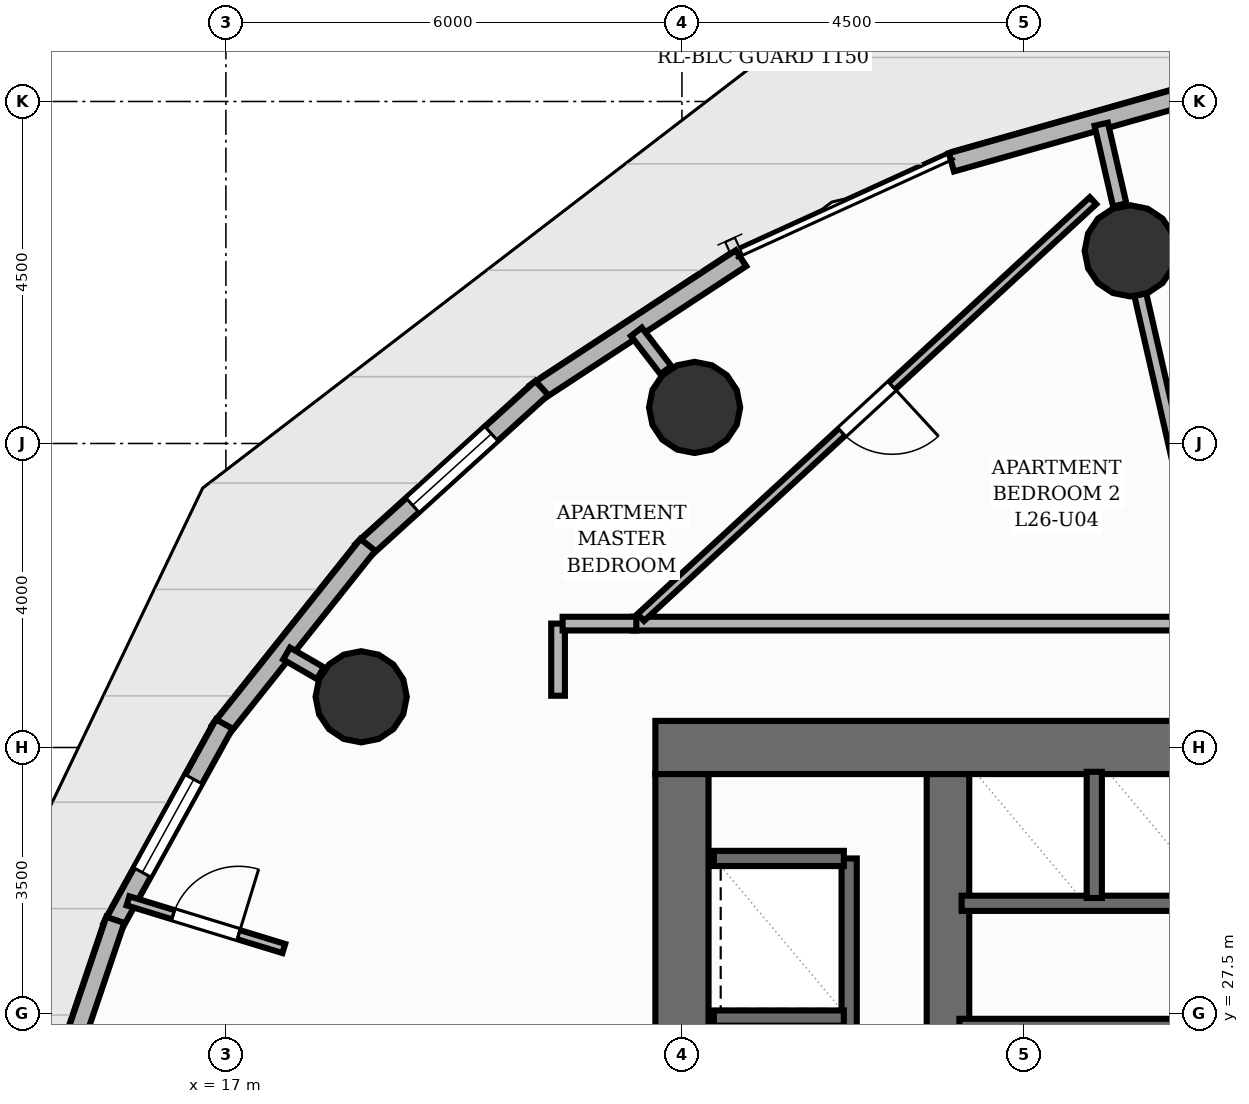
"""IFC4 building model, lengths in metres.
Left out: names, types, materials, properties, quantities, classifications, styles, units other than length and angle.
Written with IfcOpenShell. Run it as: python <this file> out.ifc"""

import sys

from ifc_helpers import new_model, si_unit, direction, frame, frame_2d, origin, origin_2d, place, context, subcontext, project, spatial, rectangle, circle, extrude, element, fill, save


model = new_model("IFC4")
c1 = context("Model", 3, precision=1e-05, world=origin(), true_north=direction((0.0, 1.0)))
c2 = subcontext(c1, "Body", "Model", "MODEL_VIEW")
j1 = project(units=[si_unit("LENGTHUNIT", "METRE"), si_unit("PLANEANGLEUNIT", "RADIAN")], contexts=[c1])
p1 = place(None, origin())
s1 = spatial("IfcSite", under=j1, at=p1, CompositionType="ELEMENT")
p2 = place(p1, origin())
s2 = spatial("IfcBuilding", under=s1, at=p2, CompositionType="ELEMENT")
p3 = place(p2, frame((0.0, 0.0, 90.08)))
s3 = spatial("IfcBuildingStorey", under=s2, at=p3, CompositionType="ELEMENT", Elevation=90.08)
p4 = place(p3, frame((22.65, 31.0, 0.0), z_axis=(0.0, 0.0, 1.0), x_axis=(1.0, 0.0, 0.0)))
e1 = element("IfcWall", 1, at=p4, inside=s3, PredefinedType="SHEAR", context=c2, shape_type="SweptSolid", body=[
    extrude(rectangle(XDim=18.7, YDim=0.7, at=frame_2d((9.35, 0.0))), origin(), (0.0, 0.0, 1.0), 3.2),
])
p5 = place(p4, frame((11.75, 0.0, 0.0)))
e2 = element("IfcOpeningElement", 2, at=p5, cuts=e1, PredefinedType="OPENING", context=c2, shape_type="SweptSolid", body=[
    extrude(rectangle(XDim=1.1, YDim=2.15, at=frame_2d((0.55, 1.075))), frame((0.0, 0.36, 0.0), z_axis=(0.0, -1.0, 0.0), x_axis=(1.0, 0.0, 0.0)), (0.0, 0.0, 1.0), 0.72),
])
p6 = place(p3, frame((23.0, 17.35, 0.0), z_axis=(0.0, 0.0, 1.0), x_axis=(0.0, 1.0, 0.0)))
e3 = element("IfcWall", 3, at=p6, inside=s3, PredefinedType="SHEAR", context=c2, shape_type="SweptSolid", body=[
    extrude(rectangle(XDim=13.3, YDim=0.7, at=frame_2d((6.65, 0.0))), origin(), (0.0, 0.0, 1.0), 3.2),
])
p7 = place(p3, frame((26.5, 17.35, 0.0), z_axis=(0.0, 0.0, 1.0), x_axis=(0.0, 1.0, 0.0)))
e4 = element("IfcWall", 4, at=p7, inside=s3, PredefinedType="SHEAR", context=c2, shape_type="SweptSolid", body=[
    extrude(rectangle(XDim=13.3, YDim=0.56, at=frame_2d((6.65, 0.0))), origin(), (0.0, 0.0, 1.0), 3.2),
])
for number, where, z_axis, x_axis in (
    (5, (28.898, 37.535, 0.0), (0.0, 0.0, 1.0), (1.0, 0.0, 0.0)),
    (6, (23.167, 35.474, 0.0), (0.0, 0.0, 1.0), (1.0, 0.0, 0.0)),
    (7, (18.78, 31.667, 0.0), (0.0, 0.0, 1.0), (1.0, 0.0, 0.0)),
):
    element("IfcColumn", number, at=place(p3, frame(where, z_axis=z_axis, x_axis=x_axis)), inside=s3, PredefinedType="COLUMN", context=c2, shape_type="SweptSolid", body=[
        extrude(circle(Radius=0.6, at=origin_2d()), origin(), (0.0, 0.0, 1.0), 3.2),
    ])
p8 = place(p3, frame((26.545, 38.699, 0.0), z_axis=(0.0, 0.0, 1.0), x_axis=(0.962134911526, 0.272573681825, 0.0)))
e8 = element("IfcWall", 8, at=p8, inside=s3, PredefinedType="SOLIDWALL", context=c2, shape_type="SweptSolid", body=[
    extrude(rectangle(XDim=3.26, YDim=0.25, at=frame_2d((1.63, 0.0))), origin(), (0.0, 0.0, 1.0), 2.96),
])
p9 = place(p3, frame((21.071, 35.663, 0.0), z_axis=(0.0, 0.0, 1.0), x_axis=(0.836273856728, 0.548311988336, 0.0)))
e9 = element("IfcWall", 9, at=p9, inside=s3, PredefinedType="SOLIDWALL", context=c2, shape_type="SweptSolid", body=[
    extrude(rectangle(XDim=3.236, YDim=0.25, at=frame_2d((1.618, 0.0))), origin(), (0.0, 0.0, 1.0), 2.96),
])
p10 = place(p3, frame((18.792, 33.586, 0.0), z_axis=(0.0, 0.0, 1.0), x_axis=(0.740832321657, 0.671690011232, 0.0)))
e10 = element("IfcWall", 10, at=p10, inside=s3, PredefinedType="SOLIDWALL", context=c2, shape_type="SweptSolid", body=[
    extrude(rectangle(XDim=3.192, YDim=0.25, at=frame_2d((1.596, 0.0))), origin(), (0.0, 0.0, 1.0), 2.96),
])
p11 = place(p10, frame((0.896, 0.0, 0.85)))
e11 = element("IfcOpeningElement", 11, at=p11, cuts=e10, PredefinedType="OPENING", context=c2, shape_type="SweptSolid", body=[
    extrude(rectangle(XDim=1.4, YDim=1.55, at=frame_2d((0.7, 0.775))), frame((0.0, 0.135, 0.0), z_axis=(0.0, -1.0, 0.0), x_axis=(1.0, 0.0, 0.0)), (0.0, 0.0, 1.0), 0.27),
])
p12 = place(p3, frame((16.916, 31.217, 0.0), z_axis=(0.0, 0.0, 1.0), x_axis=(0.623134406496, 0.782114768714, 0.0)))
e12 = element("IfcWall", 12, at=p12, inside=s3, PredefinedType="SOLIDWALL", context=c2, shape_type="SweptSolid", body=[
    extrude(rectangle(XDim=3.131, YDim=0.25, at=frame_2d((1.565, 0.0))), origin(), (0.0, 0.0, 1.0), 2.96),
])
p13 = place(p3, frame((15.5, 28.629, 0.0), z_axis=(0.0, 0.0, 1.0), x_axis=(0.482904421948, 0.875673066426, 0.0)))
e13 = element("IfcWall", 13, at=p13, inside=s3, PredefinedType="SOLIDWALL", context=c2, shape_type="SweptSolid", body=[
    extrude(rectangle(XDim=3.061, YDim=0.25, at=frame_2d((1.53, 0.0))), origin(), (0.0, 0.0, 1.0), 2.96),
])
p14 = place(p13, frame((0.83, 0.0, 0.85)))
e14 = element("IfcOpeningElement", 14, at=p14, cuts=e13, PredefinedType="OPENING", context=c2, shape_type="SweptSolid", body=[
    extrude(rectangle(XDim=1.4, YDim=1.55, at=frame_2d((0.7, 0.775))), frame((0.0, 0.135, 0.0), z_axis=(0.0, -1.0, 0.0), x_axis=(1.0, 0.0, 0.0)), (0.0, 0.0, 1.0), 0.27),
])
p15 = place(p3, frame((14.585, 25.901, 0.0), z_axis=(0.0, 0.0, 1.0), x_axis=(0.321149814784, 0.947028403198, 0.0)))
e15 = element("IfcWall", 15, at=p15, inside=s3, PredefinedType="SOLIDWALL", context=c2, shape_type="SweptSolid", body=[
    extrude(rectangle(XDim=2.988, YDim=0.25, at=frame_2d((1.494, 0.0))), origin(), (0.0, 0.0, 1.0), 2.96),
])
p16 = place(p3, frame((26.65, 27.33, 0.0), z_axis=(0.0, 0.0, 1.0), x_axis=(1.0, 0.0, 0.0)))
e16 = element("IfcWall", 16, at=p16, inside=s3, PredefinedType="SHEAR", context=c2, shape_type="SweptSolid", body=[
    extrude(rectangle(XDim=3.24, YDim=0.2, at=frame_2d((1.62, 0.0))), origin(), (0.0, 0.0, 1.0), 3.2),
])
p17 = place(p3, frame((25.2, 18.46, 0.0), z_axis=(0.0, 0.0, 1.0), x_axis=(0.0, 1.0, 0.0)))
e17 = element("IfcWall", 17, at=p17, inside=s3, PredefinedType="SHEAR", context=c2, shape_type="SweptSolid", body=[
    extrude(rectangle(XDim=11.08, YDim=0.2, at=frame_2d((5.54, 0.0))), origin(), (0.0, 0.0, 1.0), 3.2),
])
for number, where, z_axis, x_axis in (
    (18, (23.42, 29.54, 0.0), (0.0, 0.0, 1.0), (1.0, 0.0, 0.0)),
    (19, (23.42, 27.44, 0.0), (0.0, 0.0, 1.0), (1.0, 0.0, 0.0)),
):
    element("IfcWall", number, at=place(p3, frame(where, z_axis=z_axis, x_axis=x_axis)), inside=s3, PredefinedType="SHEAR", context=c2, shape_type="SweptSolid", body=[
        extrude(rectangle(XDim=1.71, YDim=0.2, at=frame_2d((0.855, 0.0))), origin(), (0.0, 0.0, 1.0), 3.2),
    ])
p18 = place(p3, frame((26.68, 28.95, 0.0), z_axis=(0.0, 0.0, 1.0), x_axis=(1.0, 0.0, 0.0)))
e20 = element("IfcWall", 20, at=p18, inside=s3, PredefinedType="SHEAR", context=c2, shape_type="SweptSolid", body=[
    extrude(rectangle(XDim=5.24, YDim=0.2, at=frame_2d((2.62, 0.0))), origin(), (0.0, 0.0, 1.0), 3.2),
])
p19 = place(p3, frame((28.425, 29.02, 0.0), z_axis=(0.0, 0.0, 1.0), x_axis=(0.0, 1.0, 0.0)))
e21 = element("IfcWall", 21, at=p19, inside=s3, PredefinedType="SHEAR", context=c2, shape_type="SweptSolid", body=[
    extrude(rectangle(XDim=1.66, YDim=0.2, at=frame_2d((0.83, 0.0))), origin(), (0.0, 0.0, 1.0), 3.2),
])
p20 = place(p3, frame((28.76, 38.139, 0.0), z_axis=(0.0, 0.0, 1.0), x_axis=(-0.223287406217, 0.974752652843, 0.0)))
e22 = element("IfcWall", 22, at=p20, inside=s3, PredefinedType="PARTITIONING", context=c2, shape_type="SweptSolid", body=[
    extrude(rectangle(XDim=1.089, YDim=0.18, at=frame_2d((0.544, 0.0))), origin(), (0.0, 0.0, 1.0), 2.26),
])
p21 = place(p3, frame((22.788, 35.966, 0.0), z_axis=(0.0, 0.0, 1.0), x_axis=(-0.609970610867, 0.792424036661, 0.0)))
e23 = element("IfcWall", 23, at=p21, inside=s3, PredefinedType="PARTITIONING", context=c2, shape_type="SweptSolid", body=[
    extrude(rectangle(XDim=0.635, YDim=0.18, at=frame_2d((0.318, 0.0))), origin(), (0.0, 0.0, 1.0), 2.26),
])
p22 = place(p3, frame((18.243, 31.978, 0.0), z_axis=(0.0, 0.0, 1.0), x_axis=(-0.864981735625, 0.501803344981, 0.0)))
e24 = element("IfcWall", 24, at=p22, inside=s3, PredefinedType="PARTITIONING", context=c2, shape_type="SweptSolid", body=[
    extrude(rectangle(XDim=0.514, YDim=0.18, at=frame_2d((0.257, 0.0))), origin(), (0.0, 0.0, 1.0), 2.26),
])
p23 = place(p3, frame((22.351, 32.63, 0.0), z_axis=(0.0, 0.0, 1.0), x_axis=(1.0, 0.0, 0.0)))
e25 = element("IfcWall", 25, at=p23, inside=s3, PredefinedType="PARTITIONING", context=c2, shape_type="SweptSolid", body=[
    extrude(rectangle(XDim=20.279, YDim=0.18, at=frame_2d((10.14, 0.0))), origin(), (0.0, 0.0, 1.0), 2.955),
])
p24 = place(p23, frame((11.378, 0.0, 0.0)))
e26 = element("IfcOpeningElement", 26, at=p24, cuts=e25, PredefinedType="OPENING", context=c2, shape_type="SweptSolid", body=[
    extrude(rectangle(XDim=1.05, YDim=2.15, at=frame_2d((0.525, 1.075))), frame((0.0, 0.1, 0.0), z_axis=(0.0, -1.0, 0.0), x_axis=(1.0, 0.0, 0.0)), (0.0, 0.0, 1.0), 0.2),
])
p25 = place(p3, frame((21.37, 31.681, 0.0), z_axis=(0.0, 0.0, 1.0), x_axis=(0.0, 1.0, 0.0)))
e27 = element("IfcWall", 27, at=p25, inside=s3, PredefinedType="PARTITIONING", context=c2, shape_type="SweptSolid", body=[
    extrude(rectangle(XDim=0.949, YDim=0.18, at=frame_2d((0.475, 0.0))), origin(), (0.0, 0.0, 1.0), 2.955),
])
p26 = place(p3, frame((21.43, 32.63, 0.0), z_axis=(0.0, 0.0, 1.0), x_axis=(1.0, 0.0, 0.0)))
e28 = element("IfcWall", 28, at=p26, inside=s3, PredefinedType="PARTITIONING", context=c2, shape_type="SweptSolid", body=[
    extrude(rectangle(XDim=0.97, YDim=0.18, at=frame_2d((0.485, 0.0))), origin(), (0.0, 0.0, 1.0), 2.955),
])
p27 = place(p3, frame((32.923, 35.293, 0.0), z_axis=(0.0, 0.0, 1.0), x_axis=(-0.994472124215, 0.105000924563, 0.0)))
e29 = element("IfcWall", 29, at=p27, inside=s3, PredefinedType="PLUMBINGWALL", context=c2, shape_type="SweptSolid", body=[
    extrude(rectangle(XDim=3.618, YDim=0.16, at=frame_2d((1.809, 0.0))), origin(), (0.0, 0.0, 1.0), 2.955),
])
p28 = place(p3, frame((30.022, 32.63, 0.0), z_axis=(0.0, 0.0, 1.0), x_axis=(-0.223321757884, 0.974744783241, 0.0)))
e30 = element("IfcWall", 30, at=p28, inside=s3, PredefinedType="PLUMBINGWALL", context=c2, shape_type="SweptSolid", body=[
    extrude(rectangle(XDim=4.442, YDim=0.16, at=frame_2d((2.221, 0.0))), origin(), (0.0, 0.0, 1.0), 2.26),
])
p29 = place(p3, frame((15.712, 28.982, 0.0), z_axis=(0.0, 0.0, 1.0), x_axis=(0.956248079097, -0.292557022175, 0.0)))
e31 = element("IfcWall", 31, at=p29, inside=s3, PredefinedType="PARTITIONING", context=c2, shape_type="SweptSolid", body=[
    extrude(rectangle(XDim=2.144, YDim=0.125, at=frame_2d((1.072, 0.0))), origin(), (0.0, 0.0, 1.0), 2.641),
])
p30 = place(p29, frame((0.622, 0.0, 0.0)))
e32 = element("IfcOpeningElement", 32, at=p30, cuts=e31, PredefinedType="OPENING", context=c2, shape_type="SweptSolid", body=[
    extrude(rectangle(XDim=0.9, YDim=2.1, at=frame_2d((0.45, 1.05))), frame((0.0, 0.073, 0.0), z_axis=(0.0, -1.0, 0.0), x_axis=(1.0, 0.0, 0.0)), (0.0, 0.0, 1.0), 0.145),
])
p31 = place(p3, frame((28.408, 38.195, 0.0), z_axis=(0.0, 0.0, 1.0), x_axis=(-0.735306461181, -0.677734762386, 0.0)))
e33 = element("IfcWall", 33, at=p31, inside=s3, PredefinedType="PARTITIONING", context=c2, shape_type="SweptSolid", body=[
    extrude(rectangle(XDim=8.091, YDim=0.125, at=frame_2d((4.045, 0.0))), origin(), (0.0, 0.0, 1.0), 2.403),
])
p32 = place(p31, frame((3.596, 0.0, 0.0)))
e34 = element("IfcOpeningElement", 34, at=p32, cuts=e33, PredefinedType="OPENING", context=c2, shape_type="SweptSolid", body=[
    extrude(rectangle(XDim=0.9, YDim=2.1, at=frame_2d((0.45, 1.05))), frame((0.0, 0.073, 0.0), z_axis=(0.0, -1.0, 0.0), x_axis=(1.0, 0.0, 0.0)), (0.0, 0.0, 1.0), 0.145),
])
p33 = place(p11, origin())
e35 = element("IfcWindow", 35, at=p33, inside=s3, PartitioningType="SINGLE_PANEL", PredefinedType="WINDOW", context=c2, shape_type="SweptSolid", body=[
    extrude(rectangle(XDim=1.4, YDim=1.55, at=frame_2d((0.7, 0.775))), frame((0.0, 0.03, 0.0), z_axis=(0.0, -1.0, 0.0), x_axis=(1.0, 0.0, 0.0)), (0.0, 0.0, 1.0), 0.06),
])
fill(e11, e35)
p34 = place(p14, origin())
e36 = element("IfcWindow", 36, at=p34, inside=s3, PartitioningType="SINGLE_PANEL", PredefinedType="WINDOW", context=c2, shape_type="SweptSolid", body=[
    extrude(rectangle(XDim=1.4, YDim=1.55, at=frame_2d((0.7, 0.775))), frame((0.0, 0.03, 0.0), z_axis=(0.0, -1.0, 0.0), x_axis=(1.0, 0.0, 0.0)), (0.0, 0.0, 1.0), 0.06),
])
fill(e14, e36)
p35 = place(p30, origin())
e37 = element("IfcDoor", 37, at=p35, inside=s3, OperationType="SINGLE_SWING_RIGHT", PredefinedType="DOOR", context=c2, shape_type="SweptSolid", body=[
    extrude(rectangle(XDim=0.9, YDim=2.1, at=frame_2d((0.45, 1.05))), frame((0.0, 0.025, 0.0), z_axis=(0.0, -1.0, 0.0), x_axis=(1.0, 0.0, 0.0)), (0.0, 0.0, 1.0), 0.05),
])
fill(e32, e37)
p36 = place(p32, origin())
e38 = element("IfcDoor", 38, at=p36, inside=s3, OperationType="SINGLE_SWING_LEFT", PredefinedType="DOOR", context=c2, shape_type="SweptSolid", body=[
    extrude(rectangle(XDim=0.9, YDim=2.1, at=frame_2d((0.45, 1.05))), frame((0.0, 0.025, 0.0), z_axis=(0.0, -1.0, 0.0), x_axis=(1.0, 0.0, 0.0)), (0.0, 0.0, 1.0), 0.05),
])
fill(e34, e38)
save(model, sys.argv[1])
